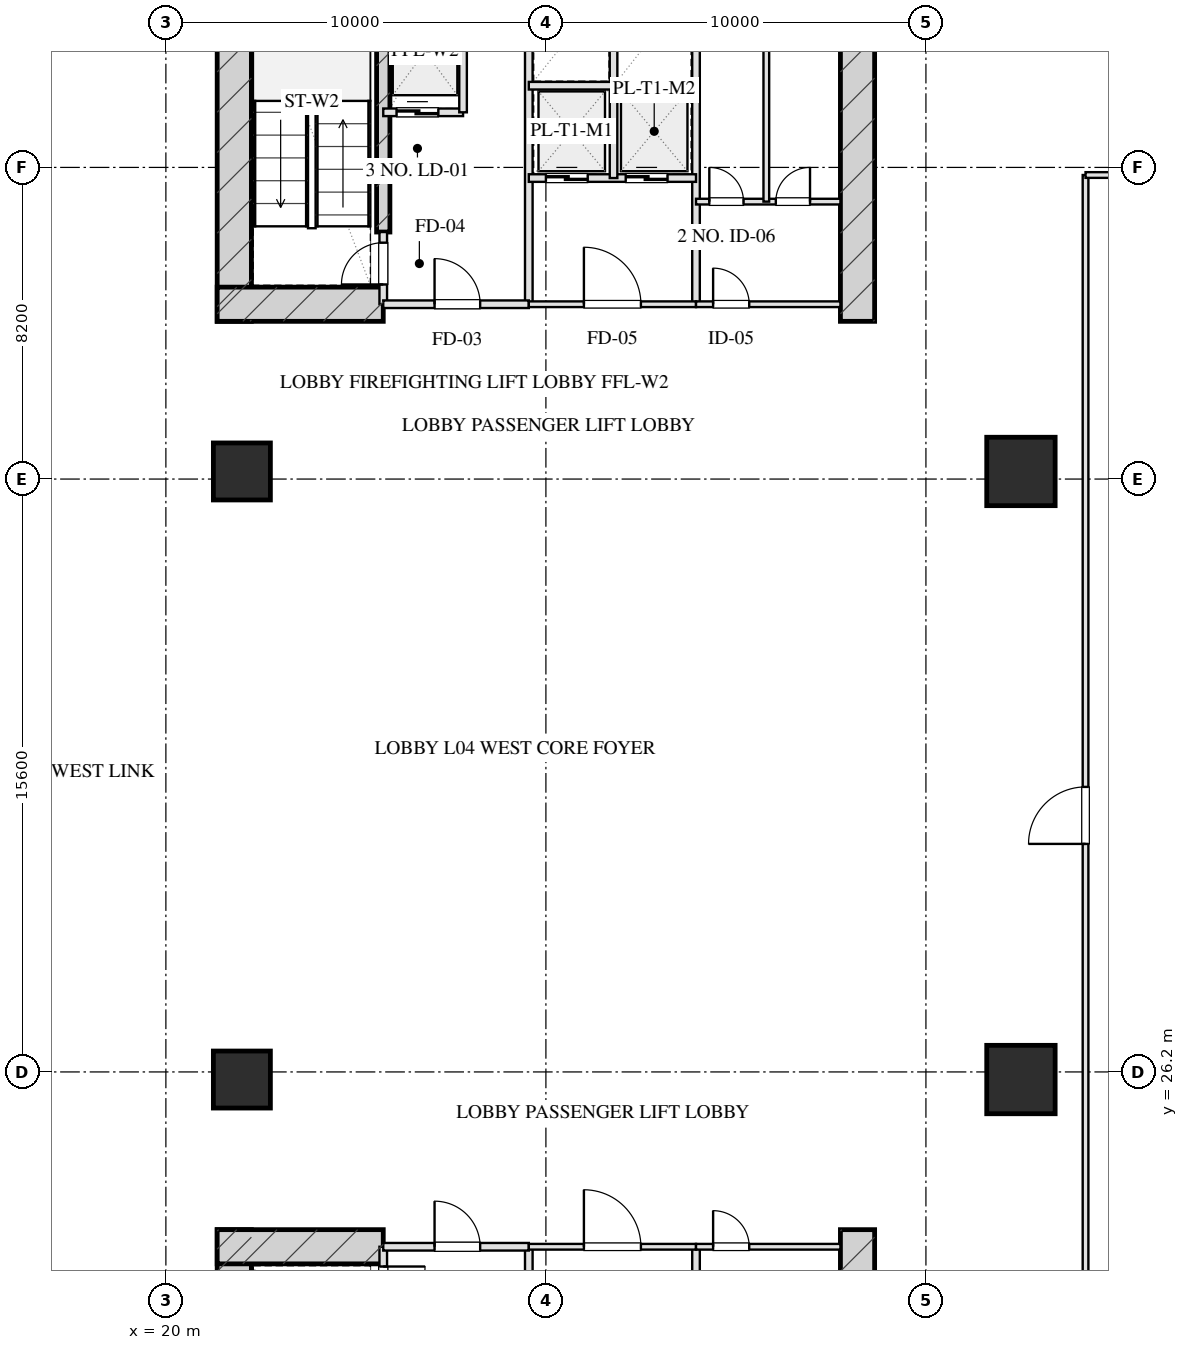
"""IFC4 building model, lengths in metres.
Left out: names, types, materials, properties, quantities, classifications, styles, units other than length and angle.
Written with IfcOpenShell. Run it as: python <this file> out.ifc"""

import sys

from ifc_helpers import new_model, si_unit, direction, frame, frame_2d, origin, origin_2d, place, context, subcontext, project, spatial, rectangle, hollow_rectangle, extrude, element, fill, save


model = new_model("IFC4")
c1 = context("Model", 3, precision=1e-05, world=origin(), true_north=direction((0.0, 1.0)))
c2 = subcontext(c1, "Body", "Model", "MODEL_VIEW")
j1 = project(units=[si_unit("LENGTHUNIT", "METRE"), si_unit("PLANEANGLEUNIT", "RADIAN")], contexts=[c1])
p1 = place(None, origin())
s1 = spatial("IfcSite", under=j1, at=p1, CompositionType="ELEMENT")
p2 = place(p1, origin())
s2 = spatial("IfcBuilding", under=s1, at=p2, CompositionType="ELEMENT")
p3 = place(p2, frame((0.0, 0.0, 22.0)))
s3 = spatial("IfcBuildingStorey", under=s2, at=p3, CompositionType="ELEMENT", Elevation=22.0)
for number, where, z_axis, x_axis in (
    (1, (21.8, 22.05, 0.0), (0.0, 0.0, 1.0), (0.0, -1.0, 0.0)),
    (2, (38.2, 22.05, 0.0), (0.0, 0.0, 1.0), (0.0, -1.0, 0.0)),
):
    element("IfcWall", number, at=place(p3, frame(where, z_axis=z_axis, x_axis=x_axis)), inside=s3, PredefinedType="SHEAR", context=c2, shape_type="SweptSolid", body=[
        extrude(rectangle(XDim=9.78, YDim=0.9, at=frame_2d((4.89, 0.0))), origin(), (0.0, 0.0, 1.0), 4.0),
    ])
p4 = place(p3, frame((21.35, 21.6, 0.0), z_axis=(0.0, 0.0, 1.0), x_axis=(1.0, 0.0, 0.0)))
e3 = element("IfcWall", 3, at=p4, inside=s3, PredefinedType="SHEAR", context=c2, shape_type="SweptSolid", body=[
    extrude(rectangle(XDim=4.37, YDim=0.9, at=frame_2d((2.185, 0.0))), origin(), (0.0, 0.0, 1.0), 4.0),
])
for number, where, z_axis, x_axis in (
    (4, (21.8, 45.95, 0.0), (0.0, 0.0, 1.0), (0.0, 1.0, 0.0)),
    (5, (38.2, 45.95, 0.0), (0.0, 0.0, 1.0), (0.0, 1.0, 0.0)),
):
    element("IfcWall", number, at=place(p3, frame(where, z_axis=z_axis, x_axis=x_axis)), inside=s3, PredefinedType="SHEAR", context=c2, shape_type="SweptSolid", body=[
        extrude(rectangle(XDim=9.78, YDim=0.9, at=frame_2d((4.89, 0.0))), origin(), (0.0, 0.0, 1.0), 4.0),
    ])
p5 = place(p3, frame((25.72, 48.3, 0.0), z_axis=(0.0, 0.0, 1.0), x_axis=(0.0, 1.0, 0.0)))
e6 = element("IfcWall", 6, at=p5, inside=s3, PredefinedType="SHEAR", context=c2, shape_type="SweptSolid", body=[
    extrude(rectangle(XDim=6.98, YDim=0.35, at=frame_2d((3.49, 0.0))), origin(), (0.0, 0.0, 1.0), 4.0),
])
p6 = place(p3, frame((21.35, 46.4, 0.0), z_axis=(0.0, 0.0, 1.0), x_axis=(1.0, 0.0, 0.0)))
e7 = element("IfcWall", 7, at=p6, inside=s3, PredefinedType="SHEAR", context=c2, shape_type="SweptSolid", body=[
    extrude(rectangle(XDim=4.37, YDim=0.9, at=frame_2d((2.185, 0.0))), origin(), (0.0, 0.0, 1.0), 4.0),
])
for number, where, z_axis, x_axis in (
    (8, (22.0, 26.0, 0.0), (0.0, 0.0, 1.0), (1.0, 0.0, 0.0)),
    (9, (22.0, 42.0, 0.0), (0.0, 0.0, 1.0), (1.0, 0.0, 0.0)),
):
    element("IfcColumn", number, at=place(p3, frame(where, z_axis=z_axis, x_axis=x_axis)), inside=s3, PredefinedType="COLUMN", context=c2, shape_type="SweptSolid", body=[
        extrude(rectangle(XDim=1.5, YDim=1.5, at=origin_2d()), origin(), (0.0, 0.0, 1.0), 4.001),
    ])
for number, where, z_axis, x_axis in (
    (10, (42.5, 26.0, 0.0), (0.0, 0.0, 1.0), (1.0, 0.0, 0.0)),
    (11, (42.5, 42.0, 0.0), (0.0, 0.0, 1.0), (1.0, 0.0, 0.0)),
):
    element("IfcColumn", number, at=place(p3, frame(where, z_axis=z_axis, x_axis=x_axis)), inside=s3, PredefinedType="COLUMN", context=c2, shape_type="SweptSolid", body=[
        extrude(hollow_rectangle(XDim=1.8, YDim=1.8, WallThickness=0.06, at=origin_2d()), origin(), (0.0, 0.0, 1.0), 4.001),
    ])
p7 = place(p3, frame((25.72, 21.6, 0.0), z_axis=(0.0, 0.0, 1.0), x_axis=(0.0, -1.0, 0.0)))
e12 = element("IfcWall", 12, at=p7, inside=s3, PredefinedType="PARTITIONING", context=c2, shape_type="SweptSolid", body=[
    extrude(rectangle(XDim=1.9, YDim=0.2, at=frame_2d((0.95, 0.0))), origin(), (0.0, 0.0, 1.0), 3.725),
])
p8 = place(p7, frame((0.52, 0.0, 0.0)))
e13 = element("IfcOpeningElement", 13, at=p8, cuts=e12, PredefinedType="OPENING", context=c2, shape_type="SweptSolid", body=[
    extrude(rectangle(XDim=1.1, YDim=2.05, at=frame_2d((0.55, 1.025))), frame((0.0, 0.11, 0.0), z_axis=(0.0, -1.0, 0.0), x_axis=(1.0, 0.0, 0.0)), (0.0, 0.0, 1.0), 0.22),
])
p9 = place(p3, frame((29.55, 21.6, 0.0), z_axis=(0.0, 0.0, 1.0), x_axis=(0.0, -1.0, 0.0)))
e14 = element("IfcWall", 14, at=p9, inside=s3, PredefinedType="PARTITIONING", context=c2, shape_type="SweptSolid", body=[
    extrude(rectangle(XDim=8.43, YDim=0.2, at=frame_2d((4.215, 0.0))), origin(), (0.0, 0.0, 1.0), 3.725),
])
p10 = place(p3, frame((25.72, 21.6, 0.0), z_axis=(0.0, 0.0, 1.0), x_axis=(1.0, 0.0, 0.0)))
e15 = element("IfcWall", 15, at=p10, inside=s3, PredefinedType="PARTITIONING", context=c2, shape_type="SweptSolid", body=[
    extrude(rectangle(XDim=3.83, YDim=0.2, at=frame_2d((1.915, 0.0))), origin(), (0.0, 0.0, 1.0), 3.725),
])
p11 = place(p10, frame((1.35, 0.0, 0.0)))
e16 = element("IfcOpeningElement", 16, at=p11, cuts=e15, PredefinedType="OPENING", context=c2, shape_type="SweptSolid", body=[
    extrude(rectangle(XDim=1.2, YDim=2.05, at=frame_2d((0.6, 1.025))), frame((0.0, 0.11, 0.0), z_axis=(0.0, -1.0, 0.0), x_axis=(1.0, 0.0, 0.0)), (0.0, 0.0, 1.0), 0.22),
])
p12 = place(p3, frame((33.95, 21.6, 0.0), z_axis=(0.0, 0.0, 1.0), x_axis=(0.0, -1.0, 0.0)))
e17 = element("IfcWall", 17, at=p12, inside=s3, PredefinedType="PARTITIONING", context=c2, shape_type="SweptSolid", body=[
    extrude(rectangle(XDim=8.43, YDim=0.2, at=frame_2d((4.215, 0.0))), origin(), (0.0, 0.0, 1.0), 3.725),
])
p13 = place(p3, frame((29.55, 21.6, 0.0), z_axis=(0.0, 0.0, 1.0), x_axis=(1.0, 0.0, 0.0)))
e18 = element("IfcWall", 18, at=p13, inside=s3, PredefinedType="PARTITIONING", context=c2, shape_type="SweptSolid", body=[
    extrude(rectangle(XDim=4.4, YDim=0.15, at=frame_2d((2.2, 0.0))), origin(), (0.0, 0.0, 1.0), 3.725),
])
p14 = place(p13, frame((1.45, 0.0, 0.0)))
e19 = element("IfcOpeningElement", 19, at=p14, cuts=e18, PredefinedType="OPENING", context=c2, shape_type="SweptSolid", body=[
    extrude(rectangle(XDim=1.5, YDim=2.05, at=frame_2d((0.75, 1.025))), frame((0.0, 0.085, 0.0), z_axis=(0.0, -1.0, 0.0), x_axis=(1.0, 0.0, 0.0)), (0.0, 0.0, 1.0), 0.17),
])
p15 = place(p3, frame((33.95, 21.6, 0.0), z_axis=(0.0, 0.0, 1.0), x_axis=(1.0, 0.0, 0.0)))
e20 = element("IfcWall", 20, at=p15, inside=s3, PredefinedType="PARTITIONING", context=c2, shape_type="SweptSolid", body=[
    extrude(rectangle(XDim=3.8, YDim=0.15, at=frame_2d((1.9, 0.0))), origin(), (0.0, 0.0, 1.0), 3.725),
])
p16 = place(p15, frame((0.45, 0.0, 0.0)))
e21 = element("IfcOpeningElement", 21, at=p16, cuts=e20, PredefinedType="OPENING", context=c2, shape_type="SweptSolid", body=[
    extrude(rectangle(XDim=0.95, YDim=2.05, at=frame_2d((0.475, 1.025))), frame((0.0, 0.085, 0.0), z_axis=(0.0, -1.0, 0.0), x_axis=(1.0, 0.0, 0.0)), (0.0, 0.0, 1.0), 0.17),
])
p17 = place(p3, frame((25.72, 46.4, 0.0), z_axis=(0.0, 0.0, 1.0), x_axis=(0.0, 1.0, 0.0)))
e22 = element("IfcWall", 22, at=p17, inside=s3, PredefinedType="PARTITIONING", context=c2, shape_type="SweptSolid", body=[
    extrude(rectangle(XDim=1.9, YDim=0.2, at=frame_2d((0.95, 0.0))), origin(), (0.0, 0.0, 1.0), 3.725),
])
p18 = place(p17, frame((0.52, 0.0, 0.0)))
e23 = element("IfcOpeningElement", 23, at=p18, cuts=e22, PredefinedType="OPENING", context=c2, shape_type="SweptSolid", body=[
    extrude(rectangle(XDim=1.1, YDim=2.05, at=frame_2d((0.55, 1.025))), frame((0.0, 0.11, 0.0), z_axis=(0.0, -1.0, 0.0), x_axis=(1.0, 0.0, 0.0)), (0.0, 0.0, 1.0), 0.22),
])
p19 = place(p3, frame((29.55, 46.4, 0.0), z_axis=(0.0, 0.0, 1.0), x_axis=(0.0, 1.0, 0.0)))
e24 = element("IfcWall", 24, at=p19, inside=s3, PredefinedType="PARTITIONING", context=c2, shape_type="SweptSolid", body=[
    extrude(rectangle(XDim=8.43, YDim=0.2, at=frame_2d((4.215, 0.0))), origin(), (0.0, 0.0, 1.0), 3.725),
])
p20 = place(p3, frame((25.72, 46.4, 0.0), z_axis=(0.0, 0.0, 1.0), x_axis=(1.0, 0.0, 0.0)))
e25 = element("IfcWall", 25, at=p20, inside=s3, PredefinedType="PARTITIONING", context=c2, shape_type="SweptSolid", body=[
    extrude(rectangle(XDim=3.83, YDim=0.2, at=frame_2d((1.915, 0.0))), origin(), (0.0, 0.0, 1.0), 3.725),
])
p21 = place(p20, frame((1.35, 0.0, 0.0)))
e26 = element("IfcOpeningElement", 26, at=p21, cuts=e25, PredefinedType="OPENING", context=c2, shape_type="SweptSolid", body=[
    extrude(rectangle(XDim=1.2, YDim=2.05, at=frame_2d((0.6, 1.025))), frame((0.0, 0.11, 0.0), z_axis=(0.0, -1.0, 0.0), x_axis=(1.0, 0.0, 0.0)), (0.0, 0.0, 1.0), 0.22),
])
p22 = place(p3, frame((25.72, 51.45, 0.0), z_axis=(0.0, 0.0, 1.0), x_axis=(1.0, 0.0, 0.0)))
e27 = element("IfcWall", 27, at=p22, inside=s3, PredefinedType="PARTITIONING", context=c2, shape_type="SweptSolid", body=[
    extrude(rectangle(XDim=2.1, YDim=0.2, at=frame_2d((1.05, 0.0))), origin(), (0.0, 0.0, 1.0), 3.725),
])
p23 = place(p22, frame((0.35, 0.0, 0.0)))
e28 = element("IfcOpeningElement", 28, at=p23, cuts=e27, PredefinedType="OPENING", context=c2, shape_type="SweptSolid", body=[
    extrude(rectangle(XDim=1.1, YDim=2.05, at=frame_2d((0.55, 1.025))), frame((0.0, 0.11, 0.0), z_axis=(0.0, -1.0, 0.0), x_axis=(1.0, 0.0, 0.0)), (0.0, 0.0, 1.0), 0.22),
])
p24 = place(p3, frame((27.82, 51.45, 0.0), z_axis=(0.0, 0.0, 1.0), x_axis=(0.0, 1.0, 0.0)))
e29 = element("IfcWall", 29, at=p24, inside=s3, PredefinedType="PARTITIONING", context=c2, shape_type="SweptSolid", body=[
    extrude(rectangle(XDim=3.7, YDim=0.2, at=frame_2d((1.85, 0.0))), origin(), (0.0, 0.0, 1.0), 3.725),
])
p25 = place(p3, frame((33.95, 46.4, 0.0), z_axis=(0.0, 0.0, 1.0), x_axis=(0.0, 1.0, 0.0)))
e30 = element("IfcWall", 30, at=p25, inside=s3, PredefinedType="PARTITIONING", context=c2, shape_type="SweptSolid", body=[
    extrude(rectangle(XDim=8.43, YDim=0.2, at=frame_2d((4.215, 0.0))), origin(), (0.0, 0.0, 1.0), 3.725),
])
p26 = place(p3, frame((29.55, 46.4, 0.0), z_axis=(0.0, 0.0, 1.0), x_axis=(1.0, 0.0, 0.0)))
e31 = element("IfcWall", 31, at=p26, inside=s3, PredefinedType="PARTITIONING", context=c2, shape_type="SweptSolid", body=[
    extrude(rectangle(XDim=4.4, YDim=0.15, at=frame_2d((2.2, 0.0))), origin(), (0.0, 0.0, 1.0), 3.725),
])
p27 = place(p26, frame((1.45, 0.0, 0.0)))
e32 = element("IfcOpeningElement", 32, at=p27, cuts=e31, PredefinedType="OPENING", context=c2, shape_type="SweptSolid", body=[
    extrude(rectangle(XDim=1.5, YDim=2.05, at=frame_2d((0.75, 1.025))), frame((0.0, 0.085, 0.0), z_axis=(0.0, -1.0, 0.0), x_axis=(1.0, 0.0, 0.0)), (0.0, 0.0, 1.0), 0.17),
])
p28 = place(p3, frame((29.55, 49.72, 0.0), z_axis=(0.0, 0.0, 1.0), x_axis=(1.0, 0.0, 0.0)))
e33 = element("IfcWall", 33, at=p28, inside=s3, PredefinedType="PARTITIONING", context=c2, shape_type="SweptSolid", body=[
    extrude(rectangle(XDim=4.4, YDim=0.2, at=frame_2d((2.2, 0.0))), origin(), (0.0, 0.0, 1.0), 3.725),
])
p29 = place(p28, frame((0.45, 0.0, 0.0)))
e34 = element("IfcOpeningElement", 34, at=p29, cuts=e33, PredefinedType="OPENING", context=c2, shape_type="SweptSolid", body=[
    extrude(rectangle(XDim=1.1, YDim=2.05, at=frame_2d((0.55, 1.025))), frame((0.0, 0.11, 0.0), z_axis=(0.0, -1.0, 0.0), x_axis=(1.0, 0.0, 0.0)), (0.0, 0.0, 1.0), 0.22),
])
p30 = place(p28, frame((2.55, 0.0, 0.0)))
e35 = element("IfcOpeningElement", 35, at=p30, cuts=e33, PredefinedType="OPENING", context=c2, shape_type="SweptSolid", body=[
    extrude(rectangle(XDim=1.1, YDim=2.05, at=frame_2d((0.55, 1.025))), frame((0.0, 0.11, 0.0), z_axis=(0.0, -1.0, 0.0), x_axis=(1.0, 0.0, 0.0)), (0.0, 0.0, 1.0), 0.22),
])
p31 = place(p3, frame((31.78, 49.72, 0.0), z_axis=(0.0, 0.0, 1.0), x_axis=(0.0, 1.0, 0.0)))
e36 = element("IfcWall", 36, at=p31, inside=s3, PredefinedType="PARTITIONING", context=c2, shape_type="SweptSolid", body=[
    extrude(rectangle(XDim=5.11, YDim=0.2, at=frame_2d((2.555, 0.0))), origin(), (0.0, 0.0, 1.0), 3.725),
])
p32 = place(p3, frame((29.55, 52.15, 0.0), z_axis=(0.0, 0.0, 1.0), x_axis=(1.0, 0.0, 0.0)))
e37 = element("IfcWall", 37, at=p32, inside=s3, PredefinedType="PARTITIONING", context=c2, shape_type="SweptSolid", body=[
    extrude(rectangle(XDim=4.4, YDim=0.2, at=frame_2d((2.2, 0.0))), origin(), (0.0, 0.0, 1.0), 3.725),
])
p33 = place(p3, frame((33.95, 46.4, 0.0), z_axis=(0.0, 0.0, 1.0), x_axis=(1.0, 0.0, 0.0)))
e38 = element("IfcWall", 38, at=p33, inside=s3, PredefinedType="PARTITIONING", context=c2, shape_type="SweptSolid", body=[
    extrude(rectangle(XDim=3.8, YDim=0.15, at=frame_2d((1.9, 0.0))), origin(), (0.0, 0.0, 1.0), 3.725),
])
p34 = place(p33, frame((0.45, 0.0, 0.0)))
e39 = element("IfcOpeningElement", 39, at=p34, cuts=e38, PredefinedType="OPENING", context=c2, shape_type="SweptSolid", body=[
    extrude(rectangle(XDim=0.95, YDim=2.05, at=frame_2d((0.475, 1.025))), frame((0.0, 0.085, 0.0), z_axis=(0.0, -1.0, 0.0), x_axis=(1.0, 0.0, 0.0)), (0.0, 0.0, 1.0), 0.17),
])
p35 = place(p3, frame((33.95, 49.1, 0.0), z_axis=(0.0, 0.0, 1.0), x_axis=(1.0, 0.0, 0.0)))
e40 = element("IfcWall", 40, at=p35, inside=s3, PredefinedType="PARTITIONING", context=c2, shape_type="SweptSolid", body=[
    extrude(rectangle(XDim=3.8, YDim=0.15, at=frame_2d((1.9, 0.0))), origin(), (0.0, 0.0, 1.0), 3.725),
])
p36 = place(p35, frame((0.35, 0.0, 0.0)))
e41 = element("IfcOpeningElement", 41, at=p36, cuts=e40, PredefinedType="OPENING", context=c2, shape_type="SweptSolid", body=[
    extrude(rectangle(XDim=0.9, YDim=2.05, at=frame_2d((0.45, 1.025))), frame((0.0, 0.085, 0.0), z_axis=(0.0, -1.0, 0.0), x_axis=(1.0, 0.0, 0.0)), (0.0, 0.0, 1.0), 0.17),
])
p37 = place(p35, frame((2.1, 0.0, 0.0)))
e42 = element("IfcOpeningElement", 42, at=p37, cuts=e40, PredefinedType="OPENING", context=c2, shape_type="SweptSolid", body=[
    extrude(rectangle(XDim=0.9, YDim=2.05, at=frame_2d((0.45, 1.025))), frame((0.0, 0.085, 0.0), z_axis=(0.0, -1.0, 0.0), x_axis=(1.0, 0.0, 0.0)), (0.0, 0.0, 1.0), 0.17),
])
p38 = place(p3, frame((35.8, 49.1, 0.0), z_axis=(0.0, 0.0, 1.0), x_axis=(0.0, 1.0, 0.0)))
e43 = element("IfcWall", 43, at=p38, inside=s3, PredefinedType="PARTITIONING", context=c2, shape_type="SweptSolid", body=[
    extrude(rectangle(XDim=5.73, YDim=0.15, at=frame_2d((2.865, 0.0))), origin(), (0.0, 0.0, 1.0), 3.725),
])
p39 = place(p3, frame((44.2, 18.2, 0.0), z_axis=(0.0, 0.0, 1.0), x_axis=(0.0, 1.0, 0.0)))
e44 = element("IfcWall", 44, at=p39, inside=s3, PredefinedType="PARTITIONING", context=c2, shape_type="SweptSolid", body=[
    extrude(rectangle(XDim=31.6, YDim=0.15, at=frame_2d((15.8, 0.0))), origin(), (0.0, 0.0, 1.0), 3.725),
])
p40 = place(p39, frame((14.0, 0.0, 0.0)))
e45 = element("IfcOpeningElement", 45, at=p40, cuts=e44, PredefinedType="OPENING", context=c2, shape_type="SweptSolid", body=[
    extrude(rectangle(XDim=1.5, YDim=2.05, at=frame_2d((0.75, 1.025))), frame((0.0, 0.085, 0.0), z_axis=(0.0, -1.0, 0.0), x_axis=(1.0, 0.0, 0.0)), (0.0, 0.0, 1.0), 0.17),
])
p41 = place(p3, frame((44.2, 49.8, 0.0), z_axis=(0.0, 0.0, 1.0), x_axis=(1.0, 0.0, 0.0)))
e46 = element("IfcWall", 46, at=p41, inside=s3, PredefinedType="PARTITIONING", context=c2, shape_type="SweptSolid", body=[
    extrude(rectangle(XDim=30.6, YDim=0.15, at=frame_2d((15.3, 0.0))), origin(), (0.0, 0.0, 1.0), 3.265),
])
p42 = place(p8, origin())
e47 = element("IfcDoor", 47, at=p42, inside=s3, OperationType="SINGLE_SWING_LEFT", PredefinedType="DOOR", context=c2, shape_type="SweptSolid", body=[
    extrude(rectangle(XDim=1.1, YDim=2.05, at=frame_2d((0.55, 1.025))), frame((0.0, 0.025, 0.0), z_axis=(0.0, -1.0, 0.0), x_axis=(1.0, 0.0, 0.0)), (0.0, 0.0, 1.0), 0.05),
])
fill(e13, e47)
p43 = place(p11, origin())
e48 = element("IfcDoor", 48, at=p43, inside=s3, OperationType="SINGLE_SWING_LEFT", PredefinedType="DOOR", context=c2, shape_type="SweptSolid", body=[
    extrude(rectangle(XDim=1.2, YDim=2.05, at=frame_2d((0.6, 1.025))), frame((0.0, 0.025, 0.0), z_axis=(0.0, -1.0, 0.0), x_axis=(1.0, 0.0, 0.0)), (0.0, 0.0, 1.0), 0.05),
])
fill(e16, e48)
p44 = place(p14, origin())
e49 = element("IfcDoor", 49, at=p44, inside=s3, OperationType="SINGLE_SWING_LEFT", PredefinedType="DOOR", context=c2, shape_type="SweptSolid", body=[
    extrude(rectangle(XDim=1.5, YDim=2.05, at=frame_2d((0.75, 1.025))), frame((0.0, 0.025, 0.0), z_axis=(0.0, -1.0, 0.0), x_axis=(1.0, 0.0, 0.0)), (0.0, 0.0, 1.0), 0.05),
])
fill(e19, e49)
p45 = place(p16, origin())
e50 = element("IfcDoor", 50, at=p45, inside=s3, OperationType="SINGLE_SWING_LEFT", PredefinedType="DOOR", context=c2, shape_type="SweptSolid", body=[
    extrude(rectangle(XDim=0.95, YDim=2.05, at=frame_2d((0.475, 1.025))), frame((0.0, 0.025, 0.0), z_axis=(0.0, -1.0, 0.0), x_axis=(1.0, 0.0, 0.0)), (0.0, 0.0, 1.0), 0.05),
])
fill(e21, e50)
p46 = place(p18, origin())
e51 = element("IfcDoor", 51, at=p46, inside=s3, OperationType="SINGLE_SWING_LEFT", PredefinedType="DOOR", context=c2, shape_type="SweptSolid", body=[
    extrude(rectangle(XDim=1.1, YDim=2.05, at=frame_2d((0.55, 1.025))), frame((0.0, 0.025, 0.0), z_axis=(0.0, -1.0, 0.0), x_axis=(1.0, 0.0, 0.0)), (0.0, 0.0, 1.0), 0.05),
])
fill(e23, e51)
p47 = place(p21, origin())
e52 = element("IfcDoor", 52, at=p47, inside=s3, OperationType="SINGLE_SWING_LEFT", PredefinedType="DOOR", context=c2, shape_type="SweptSolid", body=[
    extrude(rectangle(XDim=1.2, YDim=2.05, at=frame_2d((0.6, 1.025))), frame((0.0, 0.025, 0.0), z_axis=(0.0, -1.0, 0.0), x_axis=(1.0, 0.0, 0.0)), (0.0, 0.0, 1.0), 0.05),
])
fill(e26, e52)
p48 = place(p23, origin())
e53 = element("IfcDoor", 53, at=p48, inside=s3, OperationType="DOUBLE_DOOR_SLIDING", PredefinedType="DOOR", context=c2, shape_type="SweptSolid", body=[
    extrude(rectangle(XDim=1.1, YDim=2.05, at=frame_2d((0.55, 1.025))), frame((0.0, 0.025, 0.0), z_axis=(0.0, -1.0, 0.0), x_axis=(1.0, 0.0, 0.0)), (0.0, 0.0, 1.0), 0.05),
])
fill(e28, e53)
p49 = place(p27, origin())
e54 = element("IfcDoor", 54, at=p49, inside=s3, OperationType="SINGLE_SWING_LEFT", PredefinedType="DOOR", context=c2, shape_type="SweptSolid", body=[
    extrude(rectangle(XDim=1.5, YDim=2.05, at=frame_2d((0.75, 1.025))), frame((0.0, 0.025, 0.0), z_axis=(0.0, -1.0, 0.0), x_axis=(1.0, 0.0, 0.0)), (0.0, 0.0, 1.0), 0.05),
])
fill(e32, e54)
p50 = place(p29, origin())
e55 = element("IfcDoor", 55, at=p50, inside=s3, OperationType="DOUBLE_DOOR_SLIDING", PredefinedType="DOOR", context=c2, shape_type="SweptSolid", body=[
    extrude(rectangle(XDim=1.1, YDim=2.05, at=frame_2d((0.55, 1.025))), frame((0.0, 0.025, 0.0), z_axis=(0.0, -1.0, 0.0), x_axis=(1.0, 0.0, 0.0)), (0.0, 0.0, 1.0), 0.05),
])
fill(e34, e55)
p51 = place(p30, origin())
e56 = element("IfcDoor", 56, at=p51, inside=s3, OperationType="DOUBLE_DOOR_SLIDING", PredefinedType="DOOR", context=c2, shape_type="SweptSolid", body=[
    extrude(rectangle(XDim=1.1, YDim=2.05, at=frame_2d((0.55, 1.025))), frame((0.0, 0.025, 0.0), z_axis=(0.0, -1.0, 0.0), x_axis=(1.0, 0.0, 0.0)), (0.0, 0.0, 1.0), 0.05),
])
fill(e35, e56)
p52 = place(p34, origin())
e57 = element("IfcDoor", 57, at=p52, inside=s3, OperationType="SINGLE_SWING_LEFT", PredefinedType="DOOR", context=c2, shape_type="SweptSolid", body=[
    extrude(rectangle(XDim=0.95, YDim=2.05, at=frame_2d((0.475, 1.025))), frame((0.0, 0.025, 0.0), z_axis=(0.0, -1.0, 0.0), x_axis=(1.0, 0.0, 0.0)), (0.0, 0.0, 1.0), 0.05),
])
fill(e39, e57)
p53 = place(p36, origin())
e58 = element("IfcDoor", 58, at=p53, inside=s3, OperationType="SINGLE_SWING_LEFT", PredefinedType="DOOR", context=c2, shape_type="SweptSolid", body=[
    extrude(rectangle(XDim=0.9, YDim=2.05, at=frame_2d((0.45, 1.025))), frame((0.0, 0.025, 0.0), z_axis=(0.0, -1.0, 0.0), x_axis=(1.0, 0.0, 0.0)), (0.0, 0.0, 1.0), 0.05),
])
fill(e41, e58)
p54 = place(p37, origin())
e59 = element("IfcDoor", 59, at=p54, inside=s3, OperationType="SINGLE_SWING_RIGHT", PredefinedType="DOOR", context=c2, shape_type="SweptSolid", body=[
    extrude(rectangle(XDim=0.9, YDim=2.05, at=frame_2d((0.45, 1.025))), frame((0.0, 0.025, 0.0), z_axis=(0.0, -1.0, 0.0), x_axis=(1.0, 0.0, 0.0)), (0.0, 0.0, 1.0), 0.05),
])
fill(e42, e59)
p55 = place(p40, origin())
e60 = element("IfcDoor", 60, at=p55, inside=s3, OperationType="SINGLE_SWING_LEFT", PredefinedType="DOOR", context=c2, shape_type="SweptSolid", body=[
    extrude(rectangle(XDim=1.5, YDim=2.05, at=frame_2d((0.75, 1.025))), frame((0.0, 0.025, 0.0), z_axis=(0.0, -1.0, 0.0), x_axis=(1.0, 0.0, 0.0)), (0.0, 0.0, 1.0), 0.05),
])
fill(e45, e60)
save(model, sys.argv[1])
